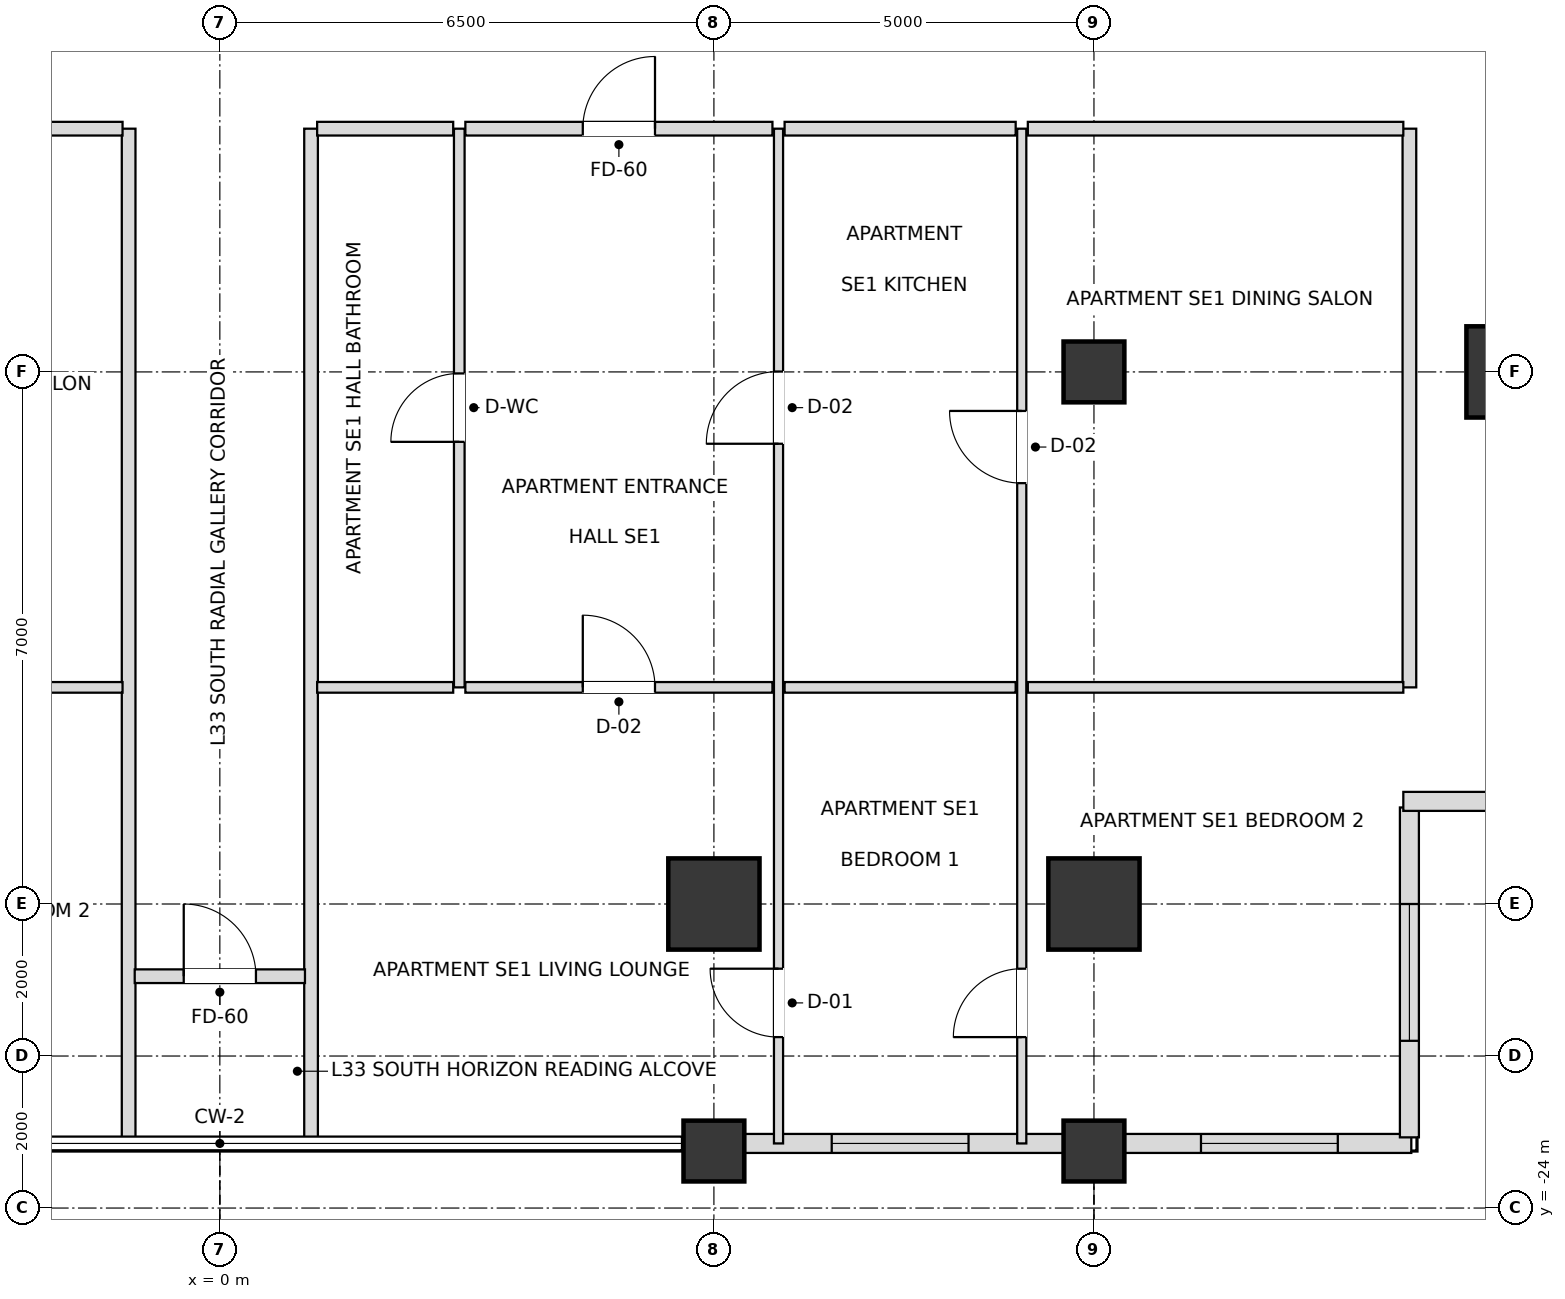
"""IFC4 building model, lengths in metres.
Left out: names, types, materials, properties, quantities, classifications, styles, units other than length and angle.
Written with IfcOpenShell. Run it as: python <this file> out.ifc"""

import sys

from ifc_helpers import new_model, si_unit, direction, frame, frame_2d, origin, origin_2d, place, context, subcontext, project, spatial, rectangle, extrude, element, fill, save


model = new_model("IFC4")
c1 = context("Model", 3, precision=1e-05, world=origin(), true_north=direction((0.0, 1.0)))
c2 = subcontext(c1, "Body", "Model", "MODEL_VIEW")
j1 = project(units=[si_unit("LENGTHUNIT", "METRE"), si_unit("PLANEANGLEUNIT", "RADIAN")], contexts=[c1])
p1 = place(None, origin())
s1 = spatial("IfcSite", under=j1, at=p1, CompositionType="ELEMENT")
p2 = place(p1, origin())
s2 = spatial("IfcBuilding", under=s1, at=p2, CompositionType="ELEMENT")
p3 = place(p2, frame((0.0, 0.0, 133.2)))
s3 = spatial("IfcBuildingStorey", under=s2, at=p3, CompositionType="ELEMENT", Elevation=133.2)
for number, where, z_axis, x_axis in (
    (1, (6.5, -20.0, 0.0), (0.0, 0.0, 1.0), (1.0, 0.0, 0.0)),
    (2, (11.5, -20.0, 0.0), (0.0, 0.0, 1.0), (1.0, 0.0, 0.0)),
    (3, (17.0, -13.0, 0.0), (0.0, 0.0, 1.0), (1.0, 0.0, 0.0)),
):
    element("IfcColumn", number, at=place(p3, frame(where, z_axis=z_axis, x_axis=x_axis)), inside=s3, PredefinedType="USERDEFINED", context=c2, shape_type="SweptSolid", body=[
        extrude(rectangle(XDim=1.2, YDim=1.2, at=origin_2d()), origin(), (0.0, 0.0, 1.0), 3.6),
    ])
for number, where, z_axis, x_axis in (
    (4, (11.5, -13.0, 0.0), (0.0, 0.0, 1.0), (1.0, 0.0, 0.0)),
    (5, (6.5, -23.25, 0.0), (0.0, 0.0, 1.0), (1.0, 0.0, 0.0)),
    (6, (11.5, -23.25, 0.0), (0.0, 0.0, 1.0), (1.0, 0.0, 0.0)),
):
    element("IfcColumn", number, at=place(p3, frame(where, z_axis=z_axis, x_axis=x_axis)), inside=s3, PredefinedType="COLUMN", context=c2, shape_type="SweptSolid", body=[
        extrude(rectangle(XDim=0.8, YDim=0.8, at=origin_2d()), origin(), (0.0, 0.0, 1.0), 3.6),
    ])
p4 = place(p3, frame((6.895, -23.15, 0.0), z_axis=(0.0, 0.0, 1.0), x_axis=(1.0, 0.0, 0.0)))
e7 = element("IfcWall", 7, at=p4, inside=s3, PredefinedType="SOLIDWALL", context=c2, shape_type="SweptSolid", body=[
    extrude(rectangle(XDim=4.21, YDim=0.25, at=frame_2d((2.105, 0.0))), origin(), (0.0, 0.0, 1.0), 2.736),
])
p5 = place(p4, frame((1.155, 0.0, 0.72)))
e8 = element("IfcOpeningElement", 8, at=p5, cuts=e7, PredefinedType="OPENING", context=c2, shape_type="SweptSolid", body=[
    extrude(rectangle(XDim=1.8, YDim=1.68, at=frame_2d((0.9, 0.84))), frame((0.0, 0.135, 0.0), z_axis=(0.0, -1.0, 0.0), x_axis=(1.0, 0.0, 0.0)), (0.0, 0.0, 1.0), 0.27),
])
p6 = place(p3, frame((11.895, -23.15, 0.0), z_axis=(0.0, 0.0, 1.0), x_axis=(1.0, 0.0, 0.0)))
e9 = element("IfcWall", 9, at=p6, inside=s3, PredefinedType="SOLIDWALL", context=c2, shape_type="SweptSolid", body=[
    extrude(rectangle(XDim=3.78, YDim=0.25, at=frame_2d((1.89, 0.0))), origin(), (0.0, 0.0, 1.0), 2.736),
])
p7 = place(p6, frame((1.013, 0.0, 0.72)))
e10 = element("IfcOpeningElement", 10, at=p7, cuts=e9, PredefinedType="OPENING", context=c2, shape_type="SweptSolid", body=[
    extrude(rectangle(XDim=1.8, YDim=1.68, at=frame_2d((0.9, 0.84))), frame((0.0, 0.135, 0.0), z_axis=(0.0, -1.0, 0.0), x_axis=(1.0, 0.0, 0.0)), (0.0, 0.0, 1.0), 0.27),
])
p8 = place(p3, frame((15.65, -23.07, 0.0), z_axis=(0.0, 0.0, 1.0), x_axis=(0.0, 1.0, 0.0)))
e11 = element("IfcWall", 11, at=p8, inside=s3, PredefinedType="SOLIDWALL", context=c2, shape_type="SweptSolid", body=[
    extrude(rectangle(XDim=4.34, YDim=0.25, at=frame_2d((2.17, 0.0))), origin(), (0.0, 0.0, 1.0), 2.736),
])
p9 = place(p8, frame((1.27, 0.0, 0.72)))
e12 = element("IfcOpeningElement", 12, at=p9, cuts=e11, PredefinedType="OPENING", context=c2, shape_type="SweptSolid", body=[
    extrude(rectangle(XDim=1.8, YDim=1.68, at=frame_2d((0.9, 0.84))), frame((0.0, 0.135, 0.0), z_axis=(0.0, -1.0, 0.0), x_axis=(1.0, 0.0, 0.0)), (0.0, 0.0, 1.0), 0.27),
])
p10 = place(p3, frame((15.57, -18.65, 0.0), z_axis=(0.0, 0.0, 1.0), x_axis=(1.0, 0.0, 0.0)))
e13 = element("IfcWall", 13, at=p10, inside=s3, PredefinedType="SOLIDWALL", context=c2, shape_type="SweptSolid", body=[
    extrude(rectangle(XDim=4.66, YDim=0.25, at=frame_2d((2.33, 0.0))), origin(), (0.0, 0.0, 1.0), 2.736),
])
p11 = place(p10, frame((1.43, 0.0, 0.72)))
e14 = element("IfcOpeningElement", 14, at=p11, cuts=e13, PredefinedType="OPENING", context=c2, shape_type="SweptSolid", body=[
    extrude(rectangle(XDim=1.8, YDim=1.68, at=frame_2d((0.9, 0.84))), frame((0.0, 0.135, 0.0), z_axis=(0.0, -1.0, 0.0), x_axis=(1.0, 0.0, 0.0)), (0.0, 0.0, 1.0), 0.27),
])
for number, where, z_axis, x_axis in (
    (15, (-1.2, -23.15, 0.0), (0.0, 0.0, 1.0), (0.0, 1.0, 0.0)),
    (16, (1.2, -23.15, 0.0), (0.0, 0.0, 1.0), (0.0, 1.0, 0.0)),
):
    element("IfcWall", number, at=place(p3, frame(where, z_axis=z_axis, x_axis=x_axis)), inside=s3, PredefinedType="PARTITIONING", context=c2, shape_type="SweptSolid", body=[
        extrude(rectangle(XDim=13.35, YDim=0.18, at=frame_2d((6.675, 0.0))), origin(), (0.0, 0.0, 1.0), 2.816),
    ])
p12 = place(p3, frame((3.15, -17.15, 0.0), z_axis=(0.0, 0.0, 1.0), x_axis=(0.0, 1.0, 0.0)))
e17 = element("IfcWall", 17, at=p12, inside=s3, PredefinedType="PARTITIONING", context=c2, shape_type="SweptSolid", body=[
    extrude(rectangle(XDim=7.35, YDim=0.14, at=frame_2d((3.675, 0.0))), origin(), (0.0, 0.0, 1.0), 3.38),
])
p13 = place(p12, frame((3.23, 0.0, 0.0)))
e18 = element("IfcOpeningElement", 18, at=p13, cuts=e17, PredefinedType="OPENING", context=c2, shape_type="SweptSolid", body=[
    extrude(rectangle(XDim=0.9, YDim=2.1, at=frame_2d((0.45, 1.05))), frame((0.0, 0.08, 0.0), z_axis=(0.0, -1.0, 0.0), x_axis=(1.0, 0.0, 0.0)), (0.0, 0.0, 1.0), 0.16),
])
p14 = place(p3, frame((7.35, -23.15, 0.0), z_axis=(0.0, 0.0, 1.0), x_axis=(0.0, 1.0, 0.0)))
e19 = element("IfcWall", 19, at=p14, inside=s3, PredefinedType="PARTITIONING", context=c2, shape_type="SweptSolid", body=[
    extrude(rectangle(XDim=13.35, YDim=0.12, at=frame_2d((6.675, 0.0))), origin(), (0.0, 0.0, 1.0), 2.816),
])
p15 = place(p14, frame((9.205, 0.0, 0.0)))
e20 = element("IfcOpeningElement", 20, at=p15, cuts=e19, PredefinedType="OPENING", context=c2, shape_type="SweptSolid", body=[
    extrude(rectangle(XDim=0.95, YDim=2.1, at=frame_2d((0.475, 1.05))), frame((0.0, 0.07, 0.0), z_axis=(0.0, -1.0, 0.0), x_axis=(1.0, 0.0, 0.0)), (0.0, 0.0, 1.0), 0.14),
])
p16 = place(p14, frame((1.399, 0.0, 0.0)))
e21 = element("IfcOpeningElement", 21, at=p16, cuts=e19, PredefinedType="OPENING", context=c2, shape_type="SweptSolid", body=[
    extrude(rectangle(XDim=0.9, YDim=2.1, at=frame_2d((0.45, 1.05))), frame((0.0, 0.07, 0.0), z_axis=(0.0, -1.0, 0.0), x_axis=(1.0, 0.0, 0.0)), (0.0, 0.0, 1.0), 0.14),
])
p17 = place(p3, frame((10.55, -23.15, 0.0), z_axis=(0.0, 0.0, 1.0), x_axis=(0.0, 1.0, 0.0)))
e22 = element("IfcWall", 22, at=p17, inside=s3, PredefinedType="PARTITIONING", context=c2, shape_type="SweptSolid", body=[
    extrude(rectangle(XDim=13.35, YDim=0.12, at=frame_2d((6.675, 0.0))), origin(), (0.0, 0.0, 1.0), 2.816),
])
p18 = place(p17, frame((8.687, 0.0, 0.0)))
e23 = element("IfcOpeningElement", 23, at=p18, cuts=e22, PredefinedType="OPENING", context=c2, shape_type="SweptSolid", body=[
    extrude(rectangle(XDim=0.95, YDim=2.1, at=frame_2d((0.475, 1.05))), frame((0.0, 0.07, 0.0), z_axis=(0.0, -1.0, 0.0), x_axis=(1.0, 0.0, 0.0)), (0.0, 0.0, 1.0), 0.14),
])
p19 = place(p17, frame((1.399, 0.0, 0.0)))
e24 = element("IfcOpeningElement", 24, at=p19, cuts=e22, PredefinedType="OPENING", context=c2, shape_type="SweptSolid", body=[
    extrude(rectangle(XDim=0.9, YDim=2.1, at=frame_2d((0.45, 1.05))), frame((0.0, 0.07, 0.0), z_axis=(0.0, -1.0, 0.0), x_axis=(1.0, 0.0, 0.0)), (0.0, 0.0, 1.0), 0.14),
])
p20 = place(p3, frame((15.65, -17.15, 0.0), z_axis=(0.0, 0.0, 1.0), x_axis=(0.0, 1.0, 0.0)))
e25 = element("IfcWall", 25, at=p20, inside=s3, PredefinedType="PARTITIONING", context=c2, shape_type="SweptSolid", body=[
    extrude(rectangle(XDim=7.35, YDim=0.18, at=frame_2d((3.675, 0.0))), origin(), (0.0, 0.0, 1.0), 2.736),
])
p21 = place(p3, frame((-1.12, -20.95, 0.0), z_axis=(0.0, 0.0, 1.0), x_axis=(1.0, 0.0, 0.0)))
e26 = element("IfcWall", 26, at=p21, inside=s3, PredefinedType="PARTITIONING", context=c2, shape_type="SweptSolid", body=[
    extrude(rectangle(XDim=2.24, YDim=0.18, at=frame_2d((1.12, 0.0))), origin(), (0.0, 0.0, 1.0), 3.38),
])
p22 = place(p21, frame((0.645, 0.0, 0.0)))
e27 = element("IfcOpeningElement", 27, at=p22, cuts=e26, PredefinedType="OPENING", context=c2, shape_type="SweptSolid", body=[
    extrude(rectangle(XDim=0.95, YDim=2.15, at=frame_2d((0.475, 1.075))), frame((0.0, 0.1, 0.0), z_axis=(0.0, -1.0, 0.0), x_axis=(1.0, 0.0, 0.0)), (0.0, 0.0, 1.0), 0.2),
])
p23 = place(p3, frame((-6.22, -17.15, 0.0), z_axis=(0.0, 0.0, 1.0), x_axis=(1.0, 0.0, 0.0)))
e28 = element("IfcWall", 28, at=p23, inside=s3, PredefinedType="PARTITIONING", context=c2, shape_type="SweptSolid", body=[
    extrude(rectangle(XDim=4.94, YDim=0.14, at=frame_2d((2.47, 0.0))), origin(), (0.0, 0.0, 1.0), 3.38),
])
p24 = place(p23, frame((1.995, 0.0, 0.0)))
e29 = element("IfcOpeningElement", 29, at=p24, cuts=e28, PredefinedType="OPENING", context=c2, shape_type="SweptSolid", body=[
    extrude(rectangle(XDim=0.95, YDim=2.1, at=frame_2d((0.475, 1.05))), frame((0.0, 0.08, 0.0), z_axis=(0.0, -1.0, 0.0), x_axis=(1.0, 0.0, 0.0)), (0.0, 0.0, 1.0), 0.16),
])
p25 = place(p3, frame((1.28, -17.15, 0.0), z_axis=(0.0, 0.0, 1.0), x_axis=(1.0, 0.0, 0.0)))
e30 = element("IfcWall", 30, at=p25, inside=s3, PredefinedType="PARTITIONING", context=c2, shape_type="SweptSolid", body=[
    extrude(rectangle(XDim=1.79, YDim=0.14, at=frame_2d((0.895, 0.0))), origin(), (0.0, 0.0, 1.0), 3.38),
])
p26 = place(p3, frame((3.23, -17.15, 0.0), z_axis=(0.0, 0.0, 1.0), x_axis=(1.0, 0.0, 0.0)))
e31 = element("IfcWall", 31, at=p26, inside=s3, PredefinedType="PARTITIONING", context=c2, shape_type="SweptSolid", body=[
    extrude(rectangle(XDim=4.04, YDim=0.14, at=frame_2d((2.02, 0.0))), origin(), (0.0, 0.0, 1.0), 2.816),
])
p27 = place(p26, frame((1.545, 0.0, 0.0)))
e32 = element("IfcOpeningElement", 32, at=p27, cuts=e31, PredefinedType="OPENING", context=c2, shape_type="SweptSolid", body=[
    extrude(rectangle(XDim=0.95, YDim=2.1, at=frame_2d((0.475, 1.05))), frame((0.0, 0.08, 0.0), z_axis=(0.0, -1.0, 0.0), x_axis=(1.0, 0.0, 0.0)), (0.0, 0.0, 1.0), 0.16),
])
p28 = place(p3, frame((7.43, -17.15, 0.0), z_axis=(0.0, 0.0, 1.0), x_axis=(1.0, 0.0, 0.0)))
e33 = element("IfcWall", 33, at=p28, inside=s3, PredefinedType="PARTITIONING", context=c2, shape_type="SweptSolid", body=[
    extrude(rectangle(XDim=3.04, YDim=0.14, at=frame_2d((1.52, 0.0))), origin(), (0.0, 0.0, 1.0), 3.38),
])
p29 = place(p3, frame((10.63, -17.15, 0.0), z_axis=(0.0, 0.0, 1.0), x_axis=(1.0, 0.0, 0.0)))
e34 = element("IfcWall", 34, at=p29, inside=s3, PredefinedType="PARTITIONING", context=c2, shape_type="SweptSolid", body=[
    extrude(rectangle(XDim=4.94, YDim=0.14, at=frame_2d((2.47, 0.0))), origin(), (0.0, 0.0, 1.0), 2.736),
])
p30 = place(p3, frame((-6.22, -9.8, 0.0), z_axis=(0.0, 0.0, 1.0), x_axis=(1.0, 0.0, 0.0)))
e35 = element("IfcWall", 35, at=p30, inside=s3, PredefinedType="PARTITIONING", context=c2, shape_type="SweptSolid", body=[
    extrude(rectangle(XDim=4.94, YDim=0.18, at=frame_2d((2.47, 0.0))), origin(), (0.0, 0.0, 1.0), 3.38),
])
p31 = place(p3, frame((1.28, -9.8, 0.0), z_axis=(0.0, 0.0, 1.0), x_axis=(1.0, 0.0, 0.0)))
e36 = element("IfcWall", 36, at=p31, inside=s3, PredefinedType="PARTITIONING", context=c2, shape_type="SweptSolid", body=[
    extrude(rectangle(XDim=1.79, YDim=0.18, at=frame_2d((0.895, 0.0))), origin(), (0.0, 0.0, 1.0), 3.38),
])
p32 = place(p3, frame((3.23, -9.8, 0.0), z_axis=(0.0, 0.0, 1.0), x_axis=(1.0, 0.0, 0.0)))
e37 = element("IfcWall", 37, at=p32, inside=s3, PredefinedType="PARTITIONING", context=c2, shape_type="SweptSolid", body=[
    extrude(rectangle(XDim=4.04, YDim=0.18, at=frame_2d((2.02, 0.0))), origin(), (0.0, 0.0, 1.0), 2.816),
])
p33 = place(p32, frame((1.545, 0.0, 0.0)))
e38 = element("IfcOpeningElement", 38, at=p33, cuts=e37, PredefinedType="OPENING", context=c2, shape_type="SweptSolid", body=[
    extrude(rectangle(XDim=0.95, YDim=2.15, at=frame_2d((0.475, 1.075))), frame((0.0, 0.1, 0.0), z_axis=(0.0, -1.0, 0.0), x_axis=(1.0, 0.0, 0.0)), (0.0, 0.0, 1.0), 0.2),
])
p34 = place(p3, frame((7.43, -9.8, 0.0), z_axis=(0.0, 0.0, 1.0), x_axis=(1.0, 0.0, 0.0)))
e39 = element("IfcWall", 39, at=p34, inside=s3, PredefinedType="PARTITIONING", context=c2, shape_type="SweptSolid", body=[
    extrude(rectangle(XDim=3.04, YDim=0.18, at=frame_2d((1.52, 0.0))), origin(), (0.0, 0.0, 1.0), 3.38),
])
p35 = place(p3, frame((10.63, -9.8, 0.0), z_axis=(0.0, 0.0, 1.0), x_axis=(1.0, 0.0, 0.0)))
e40 = element("IfcWall", 40, at=p35, inside=s3, PredefinedType="PARTITIONING", context=c2, shape_type="SweptSolid", body=[
    extrude(rectangle(XDim=4.94, YDim=0.18, at=frame_2d((2.47, 0.0))), origin(), (0.0, 0.0, 1.0), 3.38),
])
p36 = place(p5, origin())
e41 = element("IfcWindow", 41, at=p36, inside=s3, PartitioningType="SINGLE_PANEL", PredefinedType="WINDOW", context=c2, shape_type="SweptSolid", body=[
    extrude(rectangle(XDim=1.8, YDim=1.68, at=frame_2d((0.9, 0.84))), frame((0.0, 0.03, 0.0), z_axis=(0.0, -1.0, 0.0), x_axis=(1.0, 0.0, 0.0)), (0.0, 0.0, 1.0), 0.06),
])
fill(e8, e41)
p37 = place(p7, origin())
e42 = element("IfcWindow", 42, at=p37, inside=s3, PartitioningType="SINGLE_PANEL", PredefinedType="WINDOW", context=c2, shape_type="SweptSolid", body=[
    extrude(rectangle(XDim=1.8, YDim=1.68, at=frame_2d((0.9, 0.84))), frame((0.0, 0.03, 0.0), z_axis=(0.0, -1.0, 0.0), x_axis=(1.0, 0.0, 0.0)), (0.0, 0.0, 1.0), 0.06),
])
fill(e10, e42)
p38 = place(p9, origin())
e43 = element("IfcWindow", 43, at=p38, inside=s3, PartitioningType="SINGLE_PANEL", PredefinedType="WINDOW", context=c2, shape_type="SweptSolid", body=[
    extrude(rectangle(XDim=1.8, YDim=1.68, at=frame_2d((0.9, 0.84))), frame((0.0, 0.03, 0.0), z_axis=(0.0, -1.0, 0.0), x_axis=(1.0, 0.0, 0.0)), (0.0, 0.0, 1.0), 0.06),
])
fill(e12, e43)
p39 = place(p22, origin())
e44 = element("IfcDoor", 44, at=p39, inside=s3, OperationType="SINGLE_SWING_LEFT", PredefinedType="DOOR", context=c2, shape_type="SweptSolid", body=[
    extrude(rectangle(XDim=0.95, YDim=2.15, at=frame_2d((0.475, 1.075))), frame((0.0, 0.025, 0.0), z_axis=(0.0, -1.0, 0.0), x_axis=(1.0, 0.0, 0.0)), (0.0, 0.0, 1.0), 0.05),
])
fill(e27, e44)
p40 = place(p13, origin())
e45 = element("IfcDoor", 45, at=p40, inside=s3, OperationType="SINGLE_SWING_LEFT", PredefinedType="DOOR", context=c2, shape_type="SweptSolid", body=[
    extrude(rectangle(XDim=0.9, YDim=2.1, at=frame_2d((0.45, 1.05))), frame((0.0, 0.025, 0.0), z_axis=(0.0, -1.0, 0.0), x_axis=(1.0, 0.0, 0.0)), (0.0, 0.0, 1.0), 0.05),
])
fill(e18, e45)
p41 = place(p33, origin())
e46 = element("IfcDoor", 46, at=p41, inside=s3, OperationType="SINGLE_SWING_RIGHT", PredefinedType="DOOR", context=c2, shape_type="SweptSolid", body=[
    extrude(rectangle(XDim=0.95, YDim=2.15, at=frame_2d((0.475, 1.075))), frame((0.0, 0.025, 0.0), z_axis=(0.0, -1.0, 0.0), x_axis=(1.0, 0.0, 0.0)), (0.0, 0.0, 1.0), 0.05),
])
fill(e38, e46)
p42 = place(p15, origin())
e47 = element("IfcDoor", 47, at=p42, inside=s3, OperationType="SINGLE_SWING_LEFT", PredefinedType="DOOR", context=c2, shape_type="SweptSolid", body=[
    extrude(rectangle(XDim=0.95, YDim=2.1, at=frame_2d((0.475, 1.05))), frame((0.0, 0.025, 0.0), z_axis=(0.0, -1.0, 0.0), x_axis=(1.0, 0.0, 0.0)), (0.0, 0.0, 1.0), 0.05),
])
fill(e20, e47)
p43 = place(p18, origin())
e48 = element("IfcDoor", 48, at=p43, inside=s3, OperationType="SINGLE_SWING_RIGHT", PredefinedType="DOOR", context=c2, shape_type="SweptSolid", body=[
    extrude(rectangle(XDim=0.95, YDim=2.1, at=frame_2d((0.475, 1.05))), frame((0.0, 0.025, 0.0), z_axis=(0.0, -1.0, 0.0), x_axis=(1.0, 0.0, 0.0)), (0.0, 0.0, 1.0), 0.05),
])
fill(e23, e48)
p44 = place(p27, origin())
e49 = element("IfcDoor", 49, at=p44, inside=s3, OperationType="SINGLE_SWING_LEFT", PredefinedType="DOOR", context=c2, shape_type="SweptSolid", body=[
    extrude(rectangle(XDim=0.95, YDim=2.1, at=frame_2d((0.475, 1.05))), frame((0.0, 0.025, 0.0), z_axis=(0.0, -1.0, 0.0), x_axis=(1.0, 0.0, 0.0)), (0.0, 0.0, 1.0), 0.05),
])
fill(e32, e49)
p45 = place(p16, origin())
e50 = element("IfcDoor", 50, at=p45, inside=s3, OperationType="SINGLE_SWING_RIGHT", PredefinedType="DOOR", context=c2, shape_type="SweptSolid", body=[
    extrude(rectangle(XDim=0.9, YDim=2.1, at=frame_2d((0.45, 1.05))), frame((0.0, 0.025, 0.0), z_axis=(0.0, -1.0, 0.0), x_axis=(1.0, 0.0, 0.0)), (0.0, 0.0, 1.0), 0.05),
])
fill(e21, e50)
p46 = place(p19, origin())
e51 = element("IfcDoor", 51, at=p46, inside=s3, OperationType="SINGLE_SWING_LEFT", PredefinedType="DOOR", context=c2, shape_type="SweptSolid", body=[
    extrude(rectangle(XDim=0.9, YDim=2.1, at=frame_2d((0.45, 1.05))), frame((0.0, 0.025, 0.0), z_axis=(0.0, -1.0, 0.0), x_axis=(1.0, 0.0, 0.0)), (0.0, 0.0, 1.0), 0.05),
])
fill(e24, e51)
save(model, sys.argv[1])
